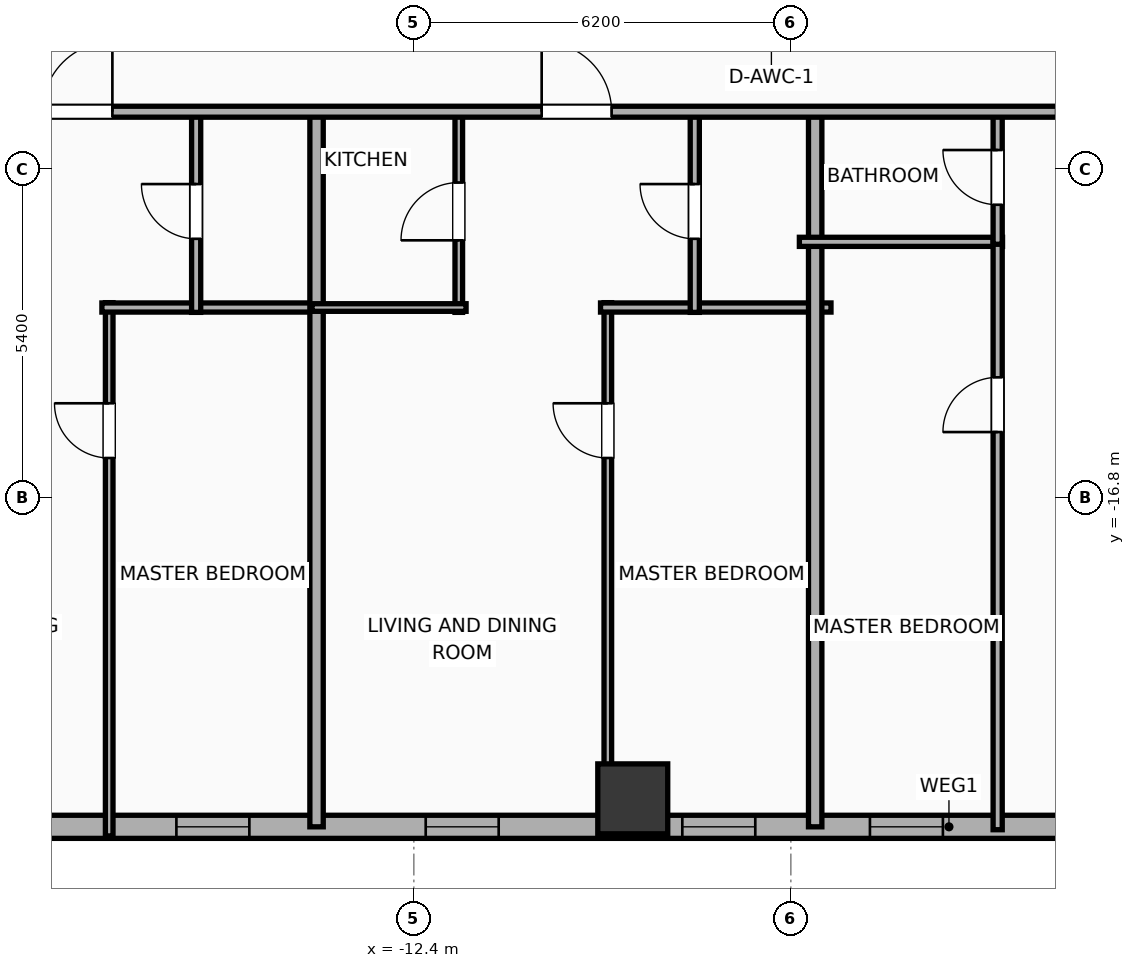
"""IFC4 building model, lengths in metres.
Left out: names, types, materials, properties, quantities, classifications, styles, units other than length and angle.
Written with IfcOpenShell. Run it as: python <this file> out.ifc"""

import sys

from ifc_helpers import new_model, si_unit, direction, frame, frame_2d, origin, origin_2d, place, context, subcontext, project, spatial, rectangle, hollow_rectangle, extrude, element, fill, save


model = new_model("IFC4")
c1 = context("Model", 3, precision=1e-05, world=origin(), true_north=direction((0.0, 1.0)))
c2 = subcontext(c1, "Body", "Model", "MODEL_VIEW")
j1 = project(units=[si_unit("LENGTHUNIT", "METRE"), si_unit("PLANEANGLEUNIT", "RADIAN")], contexts=[c1])
p1 = place(None, origin())
s1 = spatial("IfcSite", under=j1, at=p1, CompositionType="ELEMENT")
p2 = place(p1, origin())
s2 = spatial("IfcBuilding", under=s1, at=p2, CompositionType="ELEMENT")
p3 = place(p2, frame((0.0, 0.0, 72.8)))
s3 = spatial("IfcBuildingStorey", under=s2, at=p3, CompositionType="ELEMENT", Elevation=72.8)
p4 = place(p3, frame((-8.8, -21.75, 0.0), z_axis=(0.0, 0.0, 1.0), x_axis=(1.0, 0.0, 0.0)))
e1 = element("IfcColumn", 1, at=p4, inside=s3, PredefinedType="COLUMN", context=c2, shape_type="SweptSolid", body=[
    extrude(hollow_rectangle(XDim=1.15, YDim=1.15, WallThickness=0.04, at=origin_2d()), origin(), (0.0, 0.0, 1.0), 3.9),
])
p5 = place(p3, frame((22.381, -22.21, 0.0), z_axis=(0.0, 0.0, 1.0), x_axis=(-1.0, 0.0, 0.0)))
e2 = element("IfcWall", 2, at=p5, inside=s3, PredefinedType="ELEMENTEDWALL", context=c2, shape_type="SweptSolid", body=[
    extrude(rectangle(XDim=51.963, YDim=0.38, at=frame_2d((25.981, 0.0))), origin(), (0.0, 0.0, 1.0), 3.65),
])
p6 = place(p5, frame((50.372, 0.0, 0.75)))
e3 = element("IfcOpeningElement", 3, at=p6, cuts=e2, PredefinedType="OPENING", context=c2, shape_type="SweptSolid", body=[
    extrude(rectangle(XDim=0.52, YDim=2.05, at=frame_2d((0.26, 1.025))), frame((0.0, 0.2, 0.0), z_axis=(0.0, -1.0, 0.0), x_axis=(1.0, 0.0, 0.0)), (0.0, 0.0, 1.0), 0.4),
])
p7 = place(p5, frame((45.681, 0.0, 0.75)))
e4 = element("IfcOpeningElement", 4, at=p7, cuts=e2, PredefinedType="OPENING", context=c2, shape_type="SweptSolid", body=[
    extrude(rectangle(XDim=1.2, YDim=2.05, at=frame_2d((0.6, 1.025))), frame((0.0, 0.2, 0.0), z_axis=(0.0, -1.0, 0.0), x_axis=(1.0, 0.0, 0.0)), (0.0, 0.0, 1.0), 0.4),
])
p8 = place(p5, frame((48.485, 0.0, 0.75)))
e5 = element("IfcOpeningElement", 5, at=p8, cuts=e2, PredefinedType="OPENING", context=c2, shape_type="SweptSolid", body=[
    extrude(rectangle(XDim=1.2, YDim=2.05, at=frame_2d((0.6, 1.025))), frame((0.0, 0.2, 0.0), z_axis=(0.0, -1.0, 0.0), x_axis=(1.0, 0.0, 0.0)), (0.0, 0.0, 1.0), 0.4),
])
p9 = place(p5, frame((42.426, 0.0, 0.75)))
e6 = element("IfcOpeningElement", 6, at=p9, cuts=e2, PredefinedType="OPENING", context=c2, shape_type="SweptSolid", body=[
    extrude(rectangle(XDim=1.2, YDim=2.05, at=frame_2d((0.6, 1.025))), frame((0.0, 0.2, 0.0), z_axis=(0.0, -1.0, 0.0), x_axis=(1.0, 0.0, 0.0)), (0.0, 0.0, 1.0), 0.4),
])
p10 = place(p5, frame((37.486, 0.0, 0.75)))
e7 = element("IfcOpeningElement", 7, at=p10, cuts=e2, PredefinedType="OPENING", context=c2, shape_type="SweptSolid", body=[
    extrude(rectangle(XDim=1.2, YDim=2.05, at=frame_2d((0.6, 1.025))), frame((0.0, 0.2, 0.0), z_axis=(0.0, -1.0, 0.0), x_axis=(1.0, 0.0, 0.0)), (0.0, 0.0, 1.0), 0.4),
])
p11 = place(p5, frame((33.386, 0.0, 0.75)))
e8 = element("IfcOpeningElement", 8, at=p11, cuts=e2, PredefinedType="OPENING", context=c2, shape_type="SweptSolid", body=[
    extrude(rectangle(XDim=1.2, YDim=2.05, at=frame_2d((0.6, 1.025))), frame((0.0, 0.2, 0.0), z_axis=(0.0, -1.0, 0.0), x_axis=(1.0, 0.0, 0.0)), (0.0, 0.0, 1.0), 0.4),
])
p12 = place(p5, frame((29.166, 0.0, 0.75)))
e9 = element("IfcOpeningElement", 9, at=p12, cuts=e2, PredefinedType="OPENING", context=c2, shape_type="SweptSolid", body=[
    extrude(rectangle(XDim=1.2, YDim=2.05, at=frame_2d((0.6, 1.025))), frame((0.0, 0.2, 0.0), z_axis=(0.0, -1.0, 0.0), x_axis=(1.0, 0.0, 0.0)), (0.0, 0.0, 1.0), 0.4),
])
p13 = place(p5, frame((26.081, 0.0, 0.75)))
e10 = element("IfcOpeningElement", 10, at=p13, cuts=e2, PredefinedType="OPENING", context=c2, shape_type="SweptSolid", body=[
    extrude(rectangle(XDim=1.2, YDim=2.05, at=frame_2d((0.6, 1.025))), frame((0.0, 0.2, 0.0), z_axis=(0.0, -1.0, 0.0), x_axis=(1.0, 0.0, 0.0)), (0.0, 0.0, 1.0), 0.4),
])
p14 = place(p5, frame((21.981, 0.0, 0.75)))
e11 = element("IfcOpeningElement", 11, at=p14, cuts=e2, PredefinedType="OPENING", context=c2, shape_type="SweptSolid", body=[
    extrude(rectangle(XDim=1.2, YDim=2.05, at=frame_2d((0.6, 1.025))), frame((0.0, 0.2, 0.0), z_axis=(0.0, -1.0, 0.0), x_axis=(1.0, 0.0, 0.0)), (0.0, 0.0, 1.0), 0.4),
])
p15 = place(p5, frame((16.986, 0.0, 0.75)))
e12 = element("IfcOpeningElement", 12, at=p15, cuts=e2, PredefinedType="OPENING", context=c2, shape_type="SweptSolid", body=[
    extrude(rectangle(XDim=1.2, YDim=2.05, at=frame_2d((0.6, 1.025))), frame((0.0, 0.2, 0.0), z_axis=(0.0, -1.0, 0.0), x_axis=(1.0, 0.0, 0.0)), (0.0, 0.0, 1.0), 0.4),
])
p16 = place(p5, frame((12.886, 0.0, 0.75)))
e13 = element("IfcOpeningElement", 13, at=p16, cuts=e2, PredefinedType="OPENING", context=c2, shape_type="SweptSolid", body=[
    extrude(rectangle(XDim=1.2, YDim=2.05, at=frame_2d((0.6, 1.025))), frame((0.0, 0.2, 0.0), z_axis=(0.0, -1.0, 0.0), x_axis=(1.0, 0.0, 0.0)), (0.0, 0.0, 1.0), 0.4),
])
p17 = place(p5, frame((8.306, 0.0, 0.75)))
e14 = element("IfcOpeningElement", 14, at=p17, cuts=e2, PredefinedType="OPENING", context=c2, shape_type="SweptSolid", body=[
    extrude(rectangle(XDim=1.2, YDim=2.05, at=frame_2d((0.6, 1.025))), frame((0.0, 0.2, 0.0), z_axis=(0.0, -1.0, 0.0), x_axis=(1.0, 0.0, 0.0)), (0.0, 0.0, 1.0), 0.4),
])
p18 = place(p5, frame((4.686, 0.0, 0.75)))
e15 = element("IfcOpeningElement", 15, at=p18, cuts=e2, PredefinedType="OPENING", context=c2, shape_type="SweptSolid", body=[
    extrude(rectangle(XDim=1.2, YDim=2.05, at=frame_2d((0.6, 1.025))), frame((0.0, 0.2, 0.0), z_axis=(0.0, -1.0, 0.0), x_axis=(1.0, 0.0, 0.0)), (0.0, 0.0, 1.0), 0.4),
])
p19 = place(p5, frame((1.635, 0.0, 0.75)))
e16 = element("IfcOpeningElement", 16, at=p19, cuts=e2, PredefinedType="OPENING", context=c2, shape_type="SweptSolid", body=[
    extrude(rectangle(XDim=1.2, YDim=2.05, at=frame_2d((0.6, 1.025))), frame((0.0, 0.2, 0.0), z_axis=(0.0, -1.0, 0.0), x_axis=(1.0, 0.0, 0.0)), (0.0, 0.0, 1.0), 0.4),
])
p20 = place(p3, frame((-17.41, -22.36, 0.0), z_axis=(0.0, 0.0, 1.0), x_axis=(0.0, 1.0, 0.0)))
e17 = element("IfcWall", 17, at=p20, inside=s3, PredefinedType="PARTITIONING", context=c2, shape_type="SweptSolid", body=[
    extrude(rectangle(XDim=8.77, YDim=0.125, at=frame_2d((4.385, 0.0))), origin(), (0.0, 0.0, 1.0), 3.65),
])
p21 = place(p20, frame((6.215, 0.0, 0.0)))
e18 = element("IfcOpeningElement", 18, at=p21, cuts=e17, PredefinedType="OPENING", context=c2, shape_type="SweptSolid", body=[
    extrude(rectangle(XDim=0.9, YDim=2.05, at=frame_2d((0.45, 1.025))), frame((0.0, 0.073, 0.0), z_axis=(0.0, -1.0, 0.0), x_axis=(1.0, 0.0, 0.0)), (0.0, 0.0, 1.0), 0.145),
])
p22 = place(p3, frame((-17.53, -13.67, 0.0), z_axis=(0.0, 0.0, 1.0), x_axis=(1.0, 0.0, 0.0)))
e19 = element("IfcWall", 19, at=p22, inside=s3, PredefinedType="PLUMBINGWALL", context=c2, shape_type="SweptSolid", body=[
    extrude(rectangle(XDim=3.605, YDim=0.15, at=frame_2d((1.802, 0.0))), origin(), (0.0, 0.0, 1.0), 3.65),
])
p23 = place(p3, frame((-15.98, -13.75, 0.0), z_axis=(0.0, 0.0, 1.0), x_axis=(0.0, 1.0, 0.0)))
e20 = element("IfcWall", 20, at=p23, inside=s3, PredefinedType="PLUMBINGWALL", context=c2, shape_type="SweptSolid", body=[
    extrude(rectangle(XDim=3.32, YDim=0.15, at=frame_2d((1.66, 0.0))), origin(), (0.0, 0.0, 1.0), 3.65),
])
p24 = place(p23, frame((1.21, 0.0, 0.0)))
e21 = element("IfcOpeningElement", 21, at=p24, cuts=e20, PredefinedType="OPENING", context=c2, shape_type="SweptSolid", body=[
    extrude(rectangle(XDim=0.9, YDim=2.05, at=frame_2d((0.45, 1.025))), frame((0.0, 0.085, 0.0), z_axis=(0.0, -1.0, 0.0), x_axis=(1.0, 0.0, 0.0)), (0.0, 0.0, 1.0), 0.17),
])
p25 = place(p3, frame((-14.0, -22.21, 0.0), z_axis=(0.0, 0.0, 1.0), x_axis=(0.0, 1.0, 0.0)))
e22 = element("IfcWall", 22, at=p25, inside=s3, PredefinedType="PARTITIONING", context=c2, shape_type="SweptSolid", body=[
    extrude(rectangle(XDim=11.84, YDim=0.22, at=frame_2d((5.92, 0.0))), origin(), (0.0, 0.0, 1.0), 3.65),
])
p26 = place(p3, frame((-9.21, -22.36, 0.0), z_axis=(0.0, 0.0, 1.0), x_axis=(0.0, 1.0, 0.0)))
e23 = element("IfcWall", 23, at=p26, inside=s3, PredefinedType="PARTITIONING", context=c2, shape_type="SweptSolid", body=[
    extrude(rectangle(XDim=8.77, YDim=0.125, at=frame_2d((4.385, 0.0))), origin(), (0.0, 0.0, 1.0), 2.94),
])
p27 = place(p26, frame((6.215, 0.0, 0.0)))
e24 = element("IfcOpeningElement", 24, at=p27, cuts=e23, PredefinedType="OPENING", context=c2, shape_type="SweptSolid", body=[
    extrude(rectangle(XDim=0.9, YDim=2.05, at=frame_2d((0.45, 1.025))), frame((0.0, 0.073, 0.0), z_axis=(0.0, -1.0, 0.0), x_axis=(1.0, 0.0, 0.0)), (0.0, 0.0, 1.0), 0.145),
])
p28 = place(p3, frame((-9.33, -13.67, 0.0), z_axis=(0.0, 0.0, 1.0), x_axis=(1.0, 0.0, 0.0)))
e25 = element("IfcWall", 25, at=p28, inside=s3, PredefinedType="PLUMBINGWALL", context=c2, shape_type="SweptSolid", body=[
    extrude(rectangle(XDim=3.79, YDim=0.15, at=frame_2d((1.895, 0.0))), origin(), (0.0, 0.0, 1.0), 3.65),
])
p29 = place(p3, frame((-11.661, -13.75, 0.0), z_axis=(0.0, 0.0, 1.0), x_axis=(0.0, 1.0, 0.0)))
e26 = element("IfcWall", 26, at=p29, inside=s3, PredefinedType="PARTITIONING", context=c2, shape_type="SweptSolid", body=[
    extrude(rectangle(XDim=3.32, YDim=0.125, at=frame_2d((1.66, 0.0))), origin(), (0.0, 0.0, 1.0), 2.94),
])
p30 = place(p29, frame((1.185, 0.0, 0.0)))
e27 = element("IfcOpeningElement", 27, at=p30, cuts=e26, PredefinedType="OPENING", context=c2, shape_type="SweptSolid", body=[
    extrude(rectangle(XDim=0.95, YDim=2.05, at=frame_2d((0.475, 1.025))), frame((0.0, 0.073, 0.0), z_axis=(0.0, -1.0, 0.0), x_axis=(1.0, 0.0, 0.0)), (0.0, 0.0, 1.0), 0.145),
])
p31 = place(p3, frame((-14.075, -13.67, 0.0), z_axis=(0.0, 0.0, 1.0), x_axis=(1.0, 0.0, 0.0)))
e28 = element("IfcWall", 28, at=p31, inside=s3, PredefinedType="PARTITIONING", context=c2, shape_type="SweptSolid", body=[
    extrude(rectangle(XDim=2.534, YDim=0.125, at=frame_2d((1.267, 0.0))), origin(), (0.0, 0.0, 1.0), 3.65),
])
p32 = place(p3, frame((-7.78, -13.75, 0.0), z_axis=(0.0, 0.0, 1.0), x_axis=(0.0, 1.0, 0.0)))
e29 = element("IfcWall", 29, at=p32, inside=s3, PredefinedType="PLUMBINGWALL", context=c2, shape_type="SweptSolid", body=[
    extrude(rectangle(XDim=3.32, YDim=0.15, at=frame_2d((1.66, 0.0))), origin(), (0.0, 0.0, 1.0), 3.65),
])
p33 = place(p32, frame((1.21, 0.0, 0.0)))
e30 = element("IfcOpeningElement", 30, at=p33, cuts=e29, PredefinedType="OPENING", context=c2, shape_type="SweptSolid", body=[
    extrude(rectangle(XDim=0.9, YDim=2.05, at=frame_2d((0.45, 1.025))), frame((0.0, 0.085, 0.0), z_axis=(0.0, -1.0, 0.0), x_axis=(1.0, 0.0, 0.0)), (0.0, 0.0, 1.0), 0.17),
])
p34 = place(p3, frame((-5.8, -22.21, 0.0), z_axis=(0.0, 0.0, 1.0), x_axis=(0.0, 1.0, 0.0)))
e31 = element("IfcWall", 31, at=p34, inside=s3, PredefinedType="PARTITIONING", context=c2, shape_type="SweptSolid", body=[
    extrude(rectangle(XDim=11.84, YDim=0.22, at=frame_2d((5.92, 0.0))), origin(), (0.0, 0.0, 1.0), 3.65),
])
p35 = place(p3, frame((-6.06, -12.59, 0.0), z_axis=(0.0, 0.0, 1.0), x_axis=(1.0, 0.0, 0.0)))
e32 = element("IfcWall", 32, at=p35, inside=s3, PredefinedType="PLUMBINGWALL", context=c2, shape_type="SweptSolid", body=[
    extrude(rectangle(XDim=3.341, YDim=0.15, at=frame_2d((1.67, 0.0))), origin(), (0.0, 0.0, 1.0), 3.65),
])
p36 = place(p3, frame((-2.799, -22.258, 0.0), z_axis=(0.0, 0.0, 1.0), x_axis=(0.0, 1.0, 0.0)))
e33 = element("IfcWall", 33, at=p36, inside=s3, PredefinedType="PLUMBINGWALL", context=c2, shape_type="SweptSolid", body=[
    extrude(rectangle(XDim=9.708, YDim=0.15, at=frame_2d((4.854, 0.0))), origin(), (0.0, 0.0, 1.0), 3.65),
])
p37 = place(p36, frame((6.54, 0.0, 0.0)))
e34 = element("IfcOpeningElement", 34, at=p37, cuts=e33, PredefinedType="OPENING", context=c2, shape_type="SweptSolid", body=[
    extrude(rectangle(XDim=0.9, YDim=2.05, at=frame_2d((0.45, 1.025))), frame((0.0, 0.085, 0.0), z_axis=(0.0, -1.0, 0.0), x_axis=(1.0, 0.0, 0.0)), (0.0, 0.0, 1.0), 0.17),
])
p38 = place(p3, frame((-2.799, -12.63, 0.0), z_axis=(0.0, 0.0, 1.0), x_axis=(0.0, 1.0, 0.0)))
e35 = element("IfcWall", 35, at=p38, inside=s3, PredefinedType="PLUMBINGWALL", context=c2, shape_type="SweptSolid", body=[
    extrude(rectangle(XDim=2.2, YDim=0.15, at=frame_2d((1.1, 0.0))), origin(), (0.0, 0.0, 1.0), 3.65),
])
p39 = place(p38, frame((0.65, 0.0, 0.0)))
e36 = element("IfcOpeningElement", 36, at=p39, cuts=e35, PredefinedType="OPENING", context=c2, shape_type="SweptSolid", body=[
    extrude(rectangle(XDim=0.9, YDim=2.05, at=frame_2d((0.45, 1.025))), frame((0.0, 0.085, 0.0), z_axis=(0.0, -1.0, 0.0), x_axis=(1.0, 0.0, 0.0)), (0.0, 0.0, 1.0), 0.17),
])
p40 = place(p3, frame((-33.41, -10.45, 0.0), z_axis=(0.0, 0.0, 1.0), x_axis=(1.0, 0.0, 0.0)))
e37 = element("IfcWall", 37, at=p40, inside=s3, PredefinedType="PARTITIONING", context=c2, shape_type="SweptSolid", body=[
    extrude(rectangle(XDim=59.62, YDim=0.18, at=frame_2d((29.81, 0.0))), origin(), (0.0, 0.0, 1.0), 3.65),
])
p41 = place(p40, frame((2.495, 0.0, 0.0)))
e38 = element("IfcOpeningElement", 38, at=p41, cuts=e37, PredefinedType="OPENING", context=c2, shape_type="SweptSolid", body=[
    extrude(rectangle(XDim=0.9, YDim=2.05, at=frame_2d((0.45, 1.025))), frame((0.0, 0.1, 0.0), z_axis=(0.0, -1.0, 0.0), x_axis=(1.0, 0.0, 0.0)), (0.0, 0.0, 1.0), 0.2),
])
p42 = place(p40, frame((8.905, 0.0, 0.0)))
e39 = element("IfcOpeningElement", 39, at=p42, cuts=e37, PredefinedType="OPENING", context=c2, shape_type="SweptSolid", body=[
    extrude(rectangle(XDim=1.15, YDim=2.05, at=frame_2d((0.575, 1.025))), frame((0.0, 0.1, 0.0), z_axis=(0.0, -1.0, 0.0), x_axis=(1.0, 0.0, 0.0)), (0.0, 0.0, 1.0), 0.2),
])
p43 = place(p40, frame((14.902, 0.0, 0.0)))
e40 = element("IfcOpeningElement", 40, at=p43, cuts=e37, PredefinedType="OPENING", context=c2, shape_type="SweptSolid", body=[
    extrude(rectangle(XDim=1.15, YDim=2.05, at=frame_2d((0.575, 1.025))), frame((0.0, 0.1, 0.0), z_axis=(0.0, -1.0, 0.0), x_axis=(1.0, 0.0, 0.0)), (0.0, 0.0, 1.0), 0.2),
])
p44 = place(p40, frame((23.112, 0.0, 0.0)))
e41 = element("IfcOpeningElement", 41, at=p44, cuts=e37, PredefinedType="OPENING", context=c2, shape_type="SweptSolid", body=[
    extrude(rectangle(XDim=1.15, YDim=2.05, at=frame_2d((0.575, 1.025))), frame((0.0, 0.1, 0.0), z_axis=(0.0, -1.0, 0.0), x_axis=(1.0, 0.0, 0.0)), (0.0, 0.0, 1.0), 0.2),
])
p45 = place(p40, frame((31.572, 0.0, 0.0)))
e42 = element("IfcOpeningElement", 42, at=p45, cuts=e37, PredefinedType="OPENING", context=c2, shape_type="SweptSolid", body=[
    extrude(rectangle(XDim=0.9, YDim=2.05, at=frame_2d((0.45, 1.025))), frame((0.0, 0.1, 0.0), z_axis=(0.0, -1.0, 0.0), x_axis=(1.0, 0.0, 0.0)), (0.0, 0.0, 1.0), 0.2),
])
p46 = place(p40, frame((39.502, 0.0, 0.0)))
e43 = element("IfcOpeningElement", 43, at=p46, cuts=e37, PredefinedType="OPENING", context=c2, shape_type="SweptSolid", body=[
    extrude(rectangle(XDim=1.15, YDim=2.05, at=frame_2d((0.575, 1.025))), frame((0.0, 0.1, 0.0), z_axis=(0.0, -1.0, 0.0), x_axis=(1.0, 0.0, 0.0)), (0.0, 0.0, 1.0), 0.2),
])
p47 = place(p40, frame((47.699, 0.0, 0.0)))
e44 = element("IfcOpeningElement", 44, at=p47, cuts=e37, PredefinedType="OPENING", context=c2, shape_type="SweptSolid", body=[
    extrude(rectangle(XDim=1.15, YDim=2.05, at=frame_2d((0.575, 1.025))), frame((0.0, 0.1, 0.0), z_axis=(0.0, -1.0, 0.0), x_axis=(1.0, 0.0, 0.0)), (0.0, 0.0, 1.0), 0.2),
])
p48 = place(p40, frame((55.539, 0.0, 0.0)))
e45 = element("IfcOpeningElement", 45, at=p48, cuts=e37, PredefinedType="OPENING", context=c2, shape_type="SweptSolid", body=[
    extrude(rectangle(XDim=1.15, YDim=2.05, at=frame_2d((0.575, 1.025))), frame((0.0, 0.1, 0.0), z_axis=(0.0, -1.0, 0.0), x_axis=(1.0, 0.0, 0.0)), (0.0, 0.0, 1.0), 0.2),
])
p49 = place(p10, origin())
e46 = element("IfcWindow", 46, at=p49, inside=s3, PartitioningType="SINGLE_PANEL", PredefinedType="WINDOW", context=c2, shape_type="SweptSolid", body=[
    extrude(rectangle(XDim=1.2, YDim=2.05, at=frame_2d((0.6, 1.025))), frame((0.0, 0.03, 0.0), z_axis=(0.0, -1.0, 0.0), x_axis=(1.0, 0.0, 0.0)), (0.0, 0.0, 1.0), 0.06),
])
fill(e7, e46)
p50 = place(p11, origin())
e47 = element("IfcWindow", 47, at=p50, inside=s3, PartitioningType="SINGLE_PANEL", PredefinedType="WINDOW", context=c2, shape_type="SweptSolid", body=[
    extrude(rectangle(XDim=1.2, YDim=2.05, at=frame_2d((0.6, 1.025))), frame((0.0, 0.03, 0.0), z_axis=(0.0, -1.0, 0.0), x_axis=(1.0, 0.0, 0.0)), (0.0, 0.0, 1.0), 0.06),
])
fill(e8, e47)
p51 = place(p12, origin())
e48 = element("IfcWindow", 48, at=p51, inside=s3, PartitioningType="SINGLE_PANEL", PredefinedType="WINDOW", context=c2, shape_type="SweptSolid", body=[
    extrude(rectangle(XDim=1.2, YDim=2.05, at=frame_2d((0.6, 1.025))), frame((0.0, 0.03, 0.0), z_axis=(0.0, -1.0, 0.0), x_axis=(1.0, 0.0, 0.0)), (0.0, 0.0, 1.0), 0.06),
])
fill(e9, e48)
p52 = place(p13, origin())
e49 = element("IfcWindow", 49, at=p52, inside=s3, PartitioningType="SINGLE_PANEL", PredefinedType="WINDOW", context=c2, shape_type="SweptSolid", body=[
    extrude(rectangle(XDim=1.2, YDim=2.05, at=frame_2d((0.6, 1.025))), frame((0.0, 0.03, 0.0), z_axis=(0.0, -1.0, 0.0), x_axis=(1.0, 0.0, 0.0)), (0.0, 0.0, 1.0), 0.06),
])
fill(e10, e49)
p53 = place(p21, origin())
e50 = element("IfcDoor", 50, at=p53, inside=s3, OperationType="SINGLE_SWING_RIGHT", PredefinedType="DOOR", context=c2, shape_type="SweptSolid", body=[
    extrude(rectangle(XDim=0.9, YDim=2.05, at=frame_2d((0.45, 1.025))), frame((0.0, 0.025, 0.0), z_axis=(0.0, -1.0, 0.0), x_axis=(1.0, 0.0, 0.0)), (0.0, 0.0, 1.0), 0.05),
])
fill(e18, e50)
p54 = place(p24, origin())
e51 = element("IfcDoor", 51, at=p54, inside=s3, OperationType="SINGLE_SWING_RIGHT", PredefinedType="DOOR", context=c2, shape_type="SweptSolid", body=[
    extrude(rectangle(XDim=0.9, YDim=2.05, at=frame_2d((0.45, 1.025))), frame((0.0, 0.025, 0.0), z_axis=(0.0, -1.0, 0.0), x_axis=(1.0, 0.0, 0.0)), (0.0, 0.0, 1.0), 0.05),
])
fill(e21, e51)
p55 = place(p27, origin())
e52 = element("IfcDoor", 52, at=p55, inside=s3, OperationType="SINGLE_SWING_RIGHT", PredefinedType="DOOR", context=c2, shape_type="SweptSolid", body=[
    extrude(rectangle(XDim=0.9, YDim=2.05, at=frame_2d((0.45, 1.025))), frame((0.0, 0.025, 0.0), z_axis=(0.0, -1.0, 0.0), x_axis=(1.0, 0.0, 0.0)), (0.0, 0.0, 1.0), 0.05),
])
fill(e24, e52)
p56 = place(p30, origin())
e53 = element("IfcDoor", 53, at=p56, inside=s3, OperationType="SINGLE_SWING_LEFT", PredefinedType="DOOR", context=c2, shape_type="SweptSolid", body=[
    extrude(rectangle(XDim=0.95, YDim=2.05, at=frame_2d((0.475, 1.025))), frame((0.0, 0.025, 0.0), z_axis=(0.0, -1.0, 0.0), x_axis=(1.0, 0.0, 0.0)), (0.0, 0.0, 1.0), 0.05),
])
fill(e27, e53)
p57 = place(p33, origin())
e54 = element("IfcDoor", 54, at=p57, inside=s3, OperationType="SINGLE_SWING_RIGHT", PredefinedType="DOOR", context=c2, shape_type="SweptSolid", body=[
    extrude(rectangle(XDim=0.9, YDim=2.05, at=frame_2d((0.45, 1.025))), frame((0.0, 0.025, 0.0), z_axis=(0.0, -1.0, 0.0), x_axis=(1.0, 0.0, 0.0)), (0.0, 0.0, 1.0), 0.05),
])
fill(e30, e54)
p58 = place(p37, origin())
e55 = element("IfcDoor", 55, at=p58, inside=s3, OperationType="SINGLE_SWING_LEFT", PredefinedType="DOOR", context=c2, shape_type="SweptSolid", body=[
    extrude(rectangle(XDim=0.9, YDim=2.05, at=frame_2d((0.45, 1.025))), frame((0.0, 0.025, 0.0), z_axis=(0.0, -1.0, 0.0), x_axis=(1.0, 0.0, 0.0)), (0.0, 0.0, 1.0), 0.05),
])
fill(e34, e55)
p59 = place(p39, origin())
e56 = element("IfcDoor", 56, at=p59, inside=s3, OperationType="SINGLE_SWING_RIGHT", PredefinedType="DOOR", context=c2, shape_type="SweptSolid", body=[
    extrude(rectangle(XDim=0.9, YDim=2.05, at=frame_2d((0.45, 1.025))), frame((0.0, 0.025, 0.0), z_axis=(0.0, -1.0, 0.0), x_axis=(1.0, 0.0, 0.0)), (0.0, 0.0, 1.0), 0.05),
])
fill(e36, e56)
p60 = place(p43, origin())
e57 = element("IfcDoor", 57, at=p60, inside=s3, OperationType="SINGLE_SWING_RIGHT", PredefinedType="DOOR", context=c2, shape_type="SweptSolid", body=[
    extrude(rectangle(XDim=1.15, YDim=2.05, at=frame_2d((0.575, 1.025))), frame((0.0, 0.025, 0.0), z_axis=(0.0, -1.0, 0.0), x_axis=(1.0, 0.0, 0.0)), (0.0, 0.0, 1.0), 0.05),
])
fill(e40, e57)
p61 = place(p44, origin())
e58 = element("IfcDoor", 58, at=p61, inside=s3, OperationType="SINGLE_SWING_LEFT", PredefinedType="DOOR", context=c2, shape_type="SweptSolid", body=[
    extrude(rectangle(XDim=1.15, YDim=2.05, at=frame_2d((0.575, 1.025))), frame((0.0, 0.025, 0.0), z_axis=(0.0, -1.0, 0.0), x_axis=(1.0, 0.0, 0.0)), (0.0, 0.0, 1.0), 0.05),
])
fill(e41, e58)
save(model, sys.argv[1])
